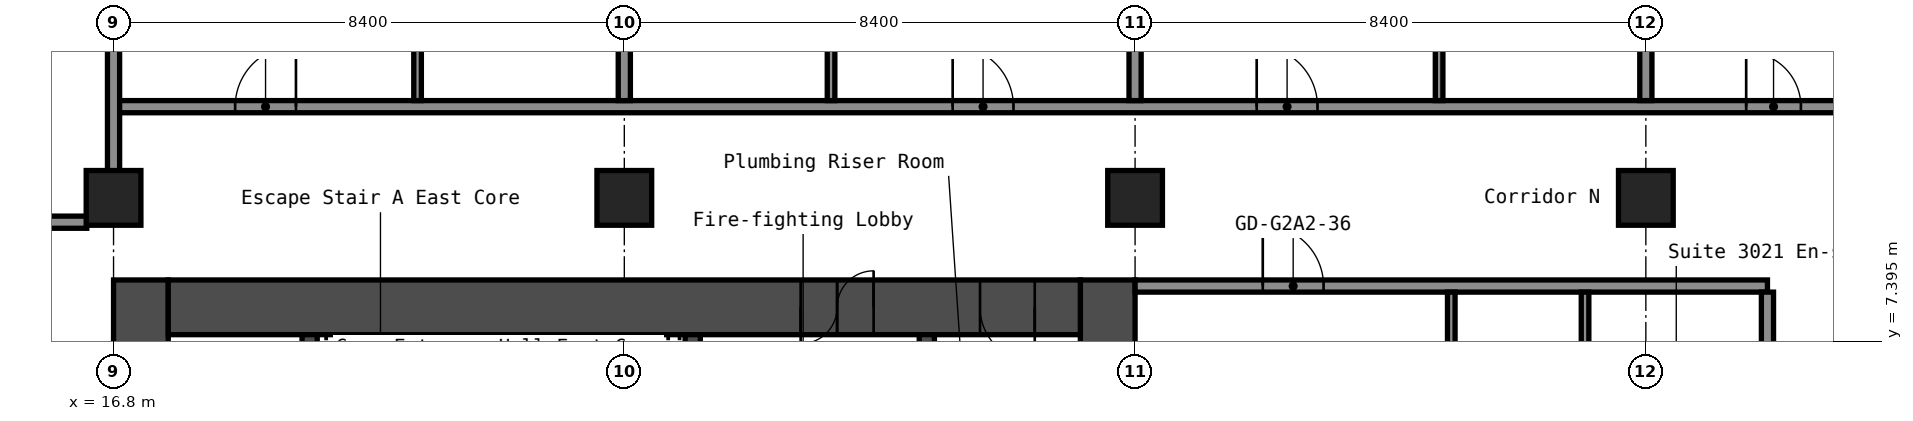
"""IFC4 building model, lengths in metres.
Left out: names, types, materials, properties, quantities, classifications, styles, units other than length and angle.
Written with IfcOpenShell. Run it as: python <this file> out.ifc"""

import sys

from ifc_helpers import new_model, si_unit, direction, frame, frame_2d, origin, origin_2d, place, context, subcontext, project, spatial, rectangle, hollow_rectangle, extrude, element, fill, save


model = new_model("IFC4")
c1 = context("Model", 3, precision=1e-05, world=origin(), true_north=direction((0.0, 1.0)))
c2 = subcontext(c1, "Body", "Model", "MODEL_VIEW")
j1 = project(units=[si_unit("LENGTHUNIT", "METRE"), si_unit("PLANEANGLEUNIT", "RADIAN")], contexts=[c1])
p1 = place(None, origin())
s1 = spatial("IfcSite", under=j1, at=p1, CompositionType="ELEMENT")
p2 = place(p1, origin())
s2 = spatial("IfcBuilding", under=s1, at=p2, CompositionType="ELEMENT")
p3 = place(p2, frame((0.0, 0.0, 107.4)))
s3 = spatial("IfcBuildingStorey", under=s2, at=p3, CompositionType="ELEMENT", Elevation=107.4)
for number, where, z_axis, x_axis in (
    (1, (16.8, 9.75, 0.0), (0.0, 0.0, 1.0), (1.0, 0.0, 0.0)),
    (2, (25.2, 9.75, 0.0), (0.0, 0.0, 1.0), (1.0, 0.0, 0.0)),
    (3, (33.6, 9.75, 0.0), (0.0, 0.0, 1.0), (1.0, 0.0, 0.0)),
    (4, (42.0, 9.75, 0.0), (0.0, 0.0, 1.0), (1.0, 0.0, 0.0)),
):
    element("IfcColumn", number, at=place(p3, frame(where, z_axis=z_axis, x_axis=x_axis)), inside=s3, PredefinedType="COLUMN", context=c2, shape_type="SweptSolid", body=[
        extrude(hollow_rectangle(XDim=0.9, YDim=0.9, WallThickness=0.036, at=origin_2d()), origin(), (0.0, 0.0, 1.0), 2.8),
    ])
p4 = place(p3, frame((17.25, -8.4, 0.0), z_axis=(0.0, 0.0, 1.0), x_axis=(0.0, 1.0, 0.0)))
e5 = element("IfcWall", 5, at=p4, inside=s3, PredefinedType="SHEAR", context=c2, shape_type="SweptSolid", body=[
    extrude(rectangle(XDim=16.8, YDim=0.9, at=frame_2d((8.4, 0.0))), origin(), (0.0, 0.0, 1.0), 2.8),
])
p5 = place(p4, frame((7.6, 0.0, 0.0)))
e6 = element("IfcOpeningElement", 6, at=p5, cuts=e5, PredefinedType="OPENING", context=c2, shape_type="SweptSolid", body=[
    extrude(rectangle(XDim=1.2, YDim=2.1, at=frame_2d((0.6, 1.05))), frame((0.0, 0.46, 0.0), z_axis=(0.0, -1.0, 0.0), x_axis=(1.0, 0.0, 0.0)), (0.0, 0.0, 1.0), 0.92),
])
p6 = place(p3, frame((33.15, -8.4, 0.0), z_axis=(0.0, 0.0, 1.0), x_axis=(0.0, 1.0, 0.0)))
e7 = element("IfcWall", 7, at=p6, inside=s3, PredefinedType="SHEAR", context=c2, shape_type="SweptSolid", body=[
    extrude(rectangle(XDim=16.8, YDim=0.9, at=frame_2d((8.4, 0.0))), origin(), (0.0, 0.0, 1.0), 2.8),
])
p7 = place(p3, frame((17.7, 7.95, 0.0), z_axis=(0.0, 0.0, 1.0), x_axis=(1.0, 0.0, 0.0)))
e8 = element("IfcWall", 8, at=p7, inside=s3, PredefinedType="SHEAR", context=c2, shape_type="SweptSolid", body=[
    extrude(rectangle(XDim=15.0, YDim=0.9, at=frame_2d((7.5, 0.0))), origin(), (0.0, 0.0, 1.0), 2.8),
])
p8 = place(p7, frame((10.4, 0.0, 0.0)))
e9 = element("IfcOpeningElement", 9, at=p8, cuts=e8, PredefinedType="OPENING", context=c2, shape_type="SweptSolid", body=[
    extrude(rectangle(XDim=1.2, YDim=2.1, at=frame_2d((0.6, 1.05))), frame((0.0, 0.46, 0.0), z_axis=(0.0, -1.0, 0.0), x_axis=(1.0, 0.0, 0.0)), (0.0, 0.0, 1.0), 0.92),
])
p9 = place(p7, frame((13.35, 0.0, 0.0)))
e10 = element("IfcOpeningElement", 10, at=p9, cuts=e8, PredefinedType="OPENING", context=c2, shape_type="SweptSolid", body=[
    extrude(rectangle(XDim=0.9, YDim=2.1, at=frame_2d((0.45, 1.05))), frame((0.0, 0.46, 0.0), z_axis=(0.0, -1.0, 0.0), x_axis=(1.0, 0.0, 0.0)), (0.0, 0.0, 1.0), 0.92),
])
p10 = place(p3, frame((20.025, 1.2, 0.0), z_axis=(0.0, 0.0, 1.0), x_axis=(0.0, 1.0, 0.0)))
e11 = element("IfcWall", 11, at=p10, inside=s3, PredefinedType="SHEAR", context=c2, shape_type="SweptSolid", body=[
    extrude(rectangle(XDim=6.3, YDim=0.25, at=frame_2d((3.15, 0.0))), origin(), (0.0, 0.0, 1.0), 2.8),
])
p11 = place(p3, frame((26.325, 3.75, 0.0), z_axis=(0.0, 0.0, 1.0), x_axis=(0.0, 1.0, 0.0)))
e12 = element("IfcWall", 12, at=p11, inside=s3, PredefinedType="SHEAR", context=c2, shape_type="SweptSolid", body=[
    extrude(rectangle(XDim=3.75, YDim=0.25, at=frame_2d((1.875, 0.0))), origin(), (0.0, 0.0, 1.0), 2.8),
])
p12 = place(p11, frame((1.25, 0.0, 0.0)))
e13 = element("IfcOpeningElement", 13, at=p12, cuts=e12, PredefinedType="OPENING", context=c2, shape_type="SweptSolid", body=[
    extrude(rectangle(XDim=1.2, YDim=2.1, at=frame_2d((0.6, 1.05))), frame((0.0, 0.135, 0.0), z_axis=(0.0, -1.0, 0.0), x_axis=(1.0, 0.0, 0.0)), (0.0, 0.0, 1.0), 0.27),
])
p13 = place(p3, frame((30.175, 1.45, 0.0), z_axis=(0.0, 0.0, 1.0), x_axis=(0.0, 1.0, 0.0)))
e14 = element("IfcWall", 14, at=p13, inside=s3, PredefinedType="SHEAR", context=c2, shape_type="SweptSolid", body=[
    extrude(rectangle(XDim=6.05, YDim=0.25, at=frame_2d((3.025, 0.0))), origin(), (0.0, 0.0, 1.0), 2.8),
])
p14 = place(p13, frame((2.625, 0.0, 0.0)))
e15 = element("IfcOpeningElement", 15, at=p14, cuts=e14, PredefinedType="OPENING", context=c2, shape_type="SweptSolid", body=[
    extrude(rectangle(XDim=1.1, YDim=2.1, at=frame_2d((0.55, 1.05))), frame((0.0, 0.135, 0.0), z_axis=(0.0, -1.0, 0.0), x_axis=(1.0, 0.0, 0.0)), (0.0, 0.0, 1.0), 0.27),
])
p15 = place(p3, frame((33.6, 8.3, 0.0), z_axis=(0.0, 0.0, 1.0), x_axis=(1.0, 0.0, 0.0)))
e16 = element("IfcWall", 16, at=p15, inside=s3, PredefinedType="PARTITIONING", context=c2, shape_type="SweptSolid", body=[
    extrude(rectangle(XDim=10.4, YDim=0.2, at=frame_2d((5.2, 0.0))), origin(), (0.0, 0.0, 1.0), 2.8),
])
p16 = place(p15, frame((2.1, 0.0, 0.0)))
e17 = element("IfcOpeningElement", 17, at=p16, cuts=e16, PredefinedType="OPENING", context=c2, shape_type="SweptSolid", body=[
    extrude(rectangle(XDim=1.0, YDim=2.1, at=frame_2d((0.5, 1.05))), frame((0.0, 0.11, 0.0), z_axis=(0.0, -1.0, 0.0), x_axis=(1.0, 0.0, 0.0)), (0.0, 0.0, 1.0), 0.22),
])
p17 = place(p3, frame((-16.36, 9.35, 0.0), z_axis=(0.0, 0.0, 1.0), x_axis=(1.0, 0.0, 0.0)))
e18 = element("IfcWall", 18, at=p17, inside=s3, PredefinedType="PARTITIONING", context=c2, shape_type="SweptSolid", body=[
    extrude(rectangle(XDim=32.72, YDim=0.2, at=frame_2d((16.36, 0.0))), origin(), (0.0, 0.0, 1.0), 2.8),
])
p18 = place(p17, frame((3.26, 0.0, 0.0)))
e19 = element("IfcOpeningElement", 19, at=p18, cuts=e18, PredefinedType="OPENING", context=c2, shape_type="SweptSolid", body=[
    extrude(rectangle(XDim=1.0, YDim=2.1, at=frame_2d((0.5, 1.05))), frame((0.0, 0.11, 0.0), z_axis=(0.0, -1.0, 0.0), x_axis=(1.0, 0.0, 0.0)), (0.0, 0.0, 1.0), 0.22),
])
p19 = place(p17, frame((9.36, 0.0, 0.0)))
e20 = element("IfcOpeningElement", 20, at=p19, cuts=e18, PredefinedType="OPENING", context=c2, shape_type="SweptSolid", body=[
    extrude(rectangle(XDim=0.9, YDim=2.1, at=frame_2d((0.45, 1.05))), frame((0.0, 0.11, 0.0), z_axis=(0.0, -1.0, 0.0), x_axis=(1.0, 0.0, 0.0)), (0.0, 0.0, 1.0), 0.22),
])
p20 = place(p17, frame((13.56, 0.0, 0.0)))
e21 = element("IfcOpeningElement", 21, at=p20, cuts=e18, PredefinedType="OPENING", context=c2, shape_type="SweptSolid", body=[
    extrude(rectangle(XDim=0.9, YDim=2.1, at=frame_2d((0.45, 1.05))), frame((0.0, 0.11, 0.0), z_axis=(0.0, -1.0, 0.0), x_axis=(1.0, 0.0, 0.0)), (0.0, 0.0, 1.0), 0.22),
])
p21 = place(p17, frame((18.345, 0.0, 0.0)))
e22 = element("IfcOpeningElement", 22, at=p21, cuts=e18, PredefinedType="OPENING", context=c2, shape_type="SweptSolid", body=[
    extrude(rectangle(XDim=0.9, YDim=2.1, at=frame_2d((0.45, 1.05))), frame((0.0, 0.11, 0.0), z_axis=(0.0, -1.0, 0.0), x_axis=(1.0, 0.0, 0.0)), (0.0, 0.0, 1.0), 0.22),
])
p22 = place(p17, frame((22.545, 0.0, 0.0)))
e23 = element("IfcOpeningElement", 23, at=p22, cuts=e18, PredefinedType="OPENING", context=c2, shape_type="SweptSolid", body=[
    extrude(rectangle(XDim=0.9, YDim=2.1, at=frame_2d((0.45, 1.05))), frame((0.0, 0.11, 0.0), z_axis=(0.0, -1.0, 0.0), x_axis=(1.0, 0.0, 0.0)), (0.0, 0.0, 1.0), 0.22),
])
p23 = place(p17, frame((25.99, 0.0, 0.0)))
e24 = element("IfcOpeningElement", 24, at=p23, cuts=e18, PredefinedType="OPENING", context=c2, shape_type="SweptSolid", body=[
    extrude(rectangle(XDim=0.9, YDim=2.1, at=frame_2d((0.45, 1.05))), frame((0.0, 0.11, 0.0), z_axis=(0.0, -1.0, 0.0), x_axis=(1.0, 0.0, 0.0)), (0.0, 0.0, 1.0), 0.22),
])
p24 = place(p17, frame((30.19, 0.0, 0.0)))
e25 = element("IfcOpeningElement", 25, at=p24, cuts=e18, PredefinedType="OPENING", context=c2, shape_type="SweptSolid", body=[
    extrude(rectangle(XDim=0.9, YDim=2.1, at=frame_2d((0.45, 1.05))), frame((0.0, 0.11, 0.0), z_axis=(0.0, -1.0, 0.0), x_axis=(1.0, 0.0, 0.0)), (0.0, 0.0, 1.0), 0.22),
])
p25 = place(p3, frame((16.8, 11.25, 0.0), z_axis=(0.0, 0.0, 1.0), x_axis=(1.0, 0.0, 0.0)))
e26 = element("IfcWall", 26, at=p25, inside=s3, PredefinedType="PARTITIONING", context=c2, shape_type="SweptSolid", body=[
    extrude(rectangle(XDim=29.7, YDim=0.2, at=frame_2d((14.85, 0.0))), origin(), (0.0, 0.0, 1.0), 2.8),
])
p26 = place(p25, frame((2.0, 0.0, 0.0)))
e27 = element("IfcOpeningElement", 27, at=p26, cuts=e26, PredefinedType="OPENING", context=c2, shape_type="SweptSolid", body=[
    extrude(rectangle(XDim=1.0, YDim=2.1, at=frame_2d((0.5, 1.05))), frame((0.0, 0.11, 0.0), z_axis=(0.0, -1.0, 0.0), x_axis=(1.0, 0.0, 0.0)), (0.0, 0.0, 1.0), 0.22),
])
p27 = place(p25, frame((13.8, 0.0, 0.0)))
e28 = element("IfcOpeningElement", 28, at=p27, cuts=e26, PredefinedType="OPENING", context=c2, shape_type="SweptSolid", body=[
    extrude(rectangle(XDim=1.0, YDim=2.1, at=frame_2d((0.5, 1.05))), frame((0.0, 0.11, 0.0), z_axis=(0.0, -1.0, 0.0), x_axis=(1.0, 0.0, 0.0)), (0.0, 0.0, 1.0), 0.22),
])
p28 = place(p25, frame((18.8, 0.0, 0.0)))
e29 = element("IfcOpeningElement", 29, at=p28, cuts=e26, PredefinedType="OPENING", context=c2, shape_type="SweptSolid", body=[
    extrude(rectangle(XDim=1.0, YDim=2.1, at=frame_2d((0.5, 1.05))), frame((0.0, 0.11, 0.0), z_axis=(0.0, -1.0, 0.0), x_axis=(1.0, 0.0, 0.0)), (0.0, 0.0, 1.0), 0.22),
])
p29 = place(p25, frame((26.85, 0.0, 0.0)))
e30 = element("IfcOpeningElement", 30, at=p29, cuts=e26, PredefinedType="OPENING", context=c2, shape_type="SweptSolid", body=[
    extrude(rectangle(XDim=0.9, YDim=2.1, at=frame_2d((0.45, 1.05))), frame((0.0, 0.11, 0.0), z_axis=(0.0, -1.0, 0.0), x_axis=(1.0, 0.0, 0.0)), (0.0, 0.0, 1.0), 0.22),
])
p30 = place(p3, frame((16.8, 10.19, 0.0), z_axis=(0.0, 0.0, 1.0), x_axis=(0.0, 1.0, 0.0)))
e31 = element("IfcWall", 31, at=p30, inside=s3, PredefinedType="PARTITIONING", context=c2, shape_type="SweptSolid", body=[
    extrude(rectangle(XDim=13.36, YDim=0.2, at=frame_2d((6.68, 0.0))), origin(), (0.0, 0.0, 1.0), 2.8),
])
p31 = place(p3, frame((21.8, 11.35, 0.0), z_axis=(0.0, 0.0, 1.0), x_axis=(0.0, 1.0, 0.0)))
e32 = element("IfcWall", 32, at=p31, inside=s3, PredefinedType="PARTITIONING", context=c2, shape_type="SweptSolid", body=[
    extrude(rectangle(XDim=3.3, YDim=0.125, at=frame_2d((1.65, 0.0))), origin(), (0.0, 0.0, 1.0), 2.8),
])
p32 = place(p3, frame((25.2, 11.35, 0.0), z_axis=(0.0, 0.0, 1.0), x_axis=(0.0, 1.0, 0.0)))
e33 = element("IfcWall", 33, at=p32, inside=s3, PredefinedType="PARTITIONING", context=c2, shape_type="SweptSolid", body=[
    extrude(rectangle(XDim=12.2, YDim=0.2, at=frame_2d((6.1, 0.0))), origin(), (0.0, 0.0, 1.0), 2.8),
])
p33 = place(p3, frame((28.6, 11.35, 0.0), z_axis=(0.0, 0.0, 1.0), x_axis=(0.0, 1.0, 0.0)))
e34 = element("IfcWall", 34, at=p33, inside=s3, PredefinedType="PARTITIONING", context=c2, shape_type="SweptSolid", body=[
    extrude(rectangle(XDim=3.3, YDim=0.125, at=frame_2d((1.65, 0.0))), origin(), (0.0, 0.0, 1.0), 2.8),
])
p34 = place(p3, frame((33.6, 11.35, 0.0), z_axis=(0.0, 0.0, 1.0), x_axis=(0.0, 1.0, 0.0)))
e35 = element("IfcWall", 35, at=p34, inside=s3, PredefinedType="PARTITIONING", context=c2, shape_type="SweptSolid", body=[
    extrude(rectangle(XDim=12.2, YDim=0.2, at=frame_2d((6.1, 0.0))), origin(), (0.0, 0.0, 1.0), 2.8),
])
p35 = place(p3, frame((38.6, 11.35, 0.0), z_axis=(0.0, 0.0, 1.0), x_axis=(0.0, 1.0, 0.0)))
e36 = element("IfcWall", 36, at=p35, inside=s3, PredefinedType="PARTITIONING", context=c2, shape_type="SweptSolid", body=[
    extrude(rectangle(XDim=3.3, YDim=0.125, at=frame_2d((1.65, 0.0))), origin(), (0.0, 0.0, 1.0), 2.8),
])
p36 = place(p3, frame((38.8, -8.2, 0.0), z_axis=(0.0, 0.0, 1.0), x_axis=(0.0, 1.0, 0.0)))
e37 = element("IfcWall", 37, at=p36, inside=s3, PredefinedType="PARTITIONING", context=c2, shape_type="SweptSolid", body=[
    extrude(rectangle(XDim=16.4, YDim=0.125, at=frame_2d((8.2, 0.0))), origin(), (0.0, 0.0, 1.0), 2.8),
])
p37 = place(p36, frame((4.05, 0.0, 0.0)))
e38 = element("IfcOpeningElement", 38, at=p37, cuts=e37, PredefinedType="OPENING", context=c2, shape_type="SweptSolid", body=[
    extrude(rectangle(XDim=0.9, YDim=2.1, at=frame_2d((0.45, 1.05))), frame((0.0, 0.073, 0.0), z_axis=(0.0, -1.0, 0.0), x_axis=(1.0, 0.0, 0.0)), (0.0, 0.0, 1.0), 0.145),
])
p38 = place(p36, frame((11.45, 0.0, 0.0)))
e39 = element("IfcOpeningElement", 39, at=p38, cuts=e37, PredefinedType="OPENING", context=c2, shape_type="SweptSolid", body=[
    extrude(rectangle(XDim=0.9, YDim=2.1, at=frame_2d((0.45, 1.05))), frame((0.0, 0.073, 0.0), z_axis=(0.0, -1.0, 0.0), x_axis=(1.0, 0.0, 0.0)), (0.0, 0.0, 1.0), 0.145),
])
p39 = place(p3, frame((41.0, 5.1, 0.0), z_axis=(0.0, 0.0, 1.0), x_axis=(0.0, 1.0, 0.0)))
e40 = element("IfcWall", 40, at=p39, inside=s3, PredefinedType="PARTITIONING", context=c2, shape_type="SweptSolid", body=[
    extrude(rectangle(XDim=3.1, YDim=0.125, at=frame_2d((1.55, 0.0))), origin(), (0.0, 0.0, 1.0), 2.8),
])
p40 = place(p3, frame((42.0, 11.35, 0.0), z_axis=(0.0, 0.0, 1.0), x_axis=(0.0, 1.0, 0.0)))
e41 = element("IfcWall", 41, at=p40, inside=s3, PredefinedType="PARTITIONING", context=c2, shape_type="SweptSolid", body=[
    extrude(rectangle(XDim=12.2, YDim=0.2, at=frame_2d((6.1, 0.0))), origin(), (0.0, 0.0, 1.0), 2.8),
])
p41 = place(p3, frame((44.0, -8.2, 0.0), z_axis=(0.0, 0.0, 1.0), x_axis=(0.0, 1.0, 0.0)))
e42 = element("IfcWall", 42, at=p41, inside=s3, PredefinedType="PARTITIONING", context=c2, shape_type="SweptSolid", body=[
    extrude(rectangle(XDim=16.4, YDim=0.2, at=frame_2d((8.2, 0.0))), origin(), (0.0, 0.0, 1.0), 2.8),
])
p42 = place(p8, origin())
e43 = element("IfcDoor", 43, at=p42, inside=s3, OperationType="DOUBLE_DOOR_SINGLE_SWING", PredefinedType="DOOR", context=c2, shape_type="SweptSolid", body=[
    extrude(rectangle(XDim=1.2, YDim=2.1, at=frame_2d((0.6, 1.05))), frame((0.0, 0.025, 0.0), z_axis=(0.0, -1.0, 0.0), x_axis=(1.0, 0.0, 0.0)), (0.0, 0.0, 1.0), 0.05),
])
fill(e9, e43)
p43 = place(p9, origin())
e44 = element("IfcDoor", 44, at=p43, inside=s3, OperationType="SINGLE_SWING_RIGHT", PredefinedType="DOOR", context=c2, shape_type="SweptSolid", body=[
    extrude(rectangle(XDim=0.9, YDim=2.1, at=frame_2d((0.45, 1.05))), frame((0.0, 0.025, 0.0), z_axis=(0.0, -1.0, 0.0), x_axis=(1.0, 0.0, 0.0)), (0.0, 0.0, 1.0), 0.05),
])
fill(e10, e44)
p44 = place(p16, origin())
e45 = element("IfcDoor", 45, at=p44, inside=s3, OperationType="SINGLE_SWING_RIGHT", PredefinedType="DOOR", context=c2, shape_type="SweptSolid", body=[
    extrude(rectangle(XDim=1.0, YDim=2.1, at=frame_2d((0.5, 1.05))), frame((0.0, 0.025, 0.0), z_axis=(0.0, -1.0, 0.0), x_axis=(1.0, 0.0, 0.0)), (0.0, 0.0, 1.0), 0.05),
])
fill(e17, e45)
p45 = place(p26, origin())
e46 = element("IfcDoor", 46, at=p45, inside=s3, OperationType="SINGLE_SWING_LEFT", PredefinedType="DOOR", context=c2, shape_type="SweptSolid", body=[
    extrude(rectangle(XDim=1.0, YDim=2.1, at=frame_2d((0.5, 1.05))), frame((0.0, 0.025, 0.0), z_axis=(0.0, -1.0, 0.0), x_axis=(1.0, 0.0, 0.0)), (0.0, 0.0, 1.0), 0.05),
])
fill(e27, e46)
p46 = place(p27, origin())
e47 = element("IfcDoor", 47, at=p46, inside=s3, OperationType="SINGLE_SWING_RIGHT", PredefinedType="DOOR", context=c2, shape_type="SweptSolid", body=[
    extrude(rectangle(XDim=1.0, YDim=2.1, at=frame_2d((0.5, 1.05))), frame((0.0, 0.025, 0.0), z_axis=(0.0, -1.0, 0.0), x_axis=(1.0, 0.0, 0.0)), (0.0, 0.0, 1.0), 0.05),
])
fill(e28, e47)
p47 = place(p28, origin())
e48 = element("IfcDoor", 48, at=p47, inside=s3, OperationType="SINGLE_SWING_RIGHT", PredefinedType="DOOR", context=c2, shape_type="SweptSolid", body=[
    extrude(rectangle(XDim=1.0, YDim=2.1, at=frame_2d((0.5, 1.05))), frame((0.0, 0.025, 0.0), z_axis=(0.0, -1.0, 0.0), x_axis=(1.0, 0.0, 0.0)), (0.0, 0.0, 1.0), 0.05),
])
fill(e29, e48)
p48 = place(p29, origin())
e49 = element("IfcDoor", 49, at=p48, inside=s3, OperationType="SINGLE_SWING_RIGHT", PredefinedType="DOOR", context=c2, shape_type="SweptSolid", body=[
    extrude(rectangle(XDim=0.9, YDim=2.1, at=frame_2d((0.45, 1.05))), frame((0.0, 0.025, 0.0), z_axis=(0.0, -1.0, 0.0), x_axis=(1.0, 0.0, 0.0)), (0.0, 0.0, 1.0), 0.05),
])
fill(e30, e49)
save(model, sys.argv[1])
